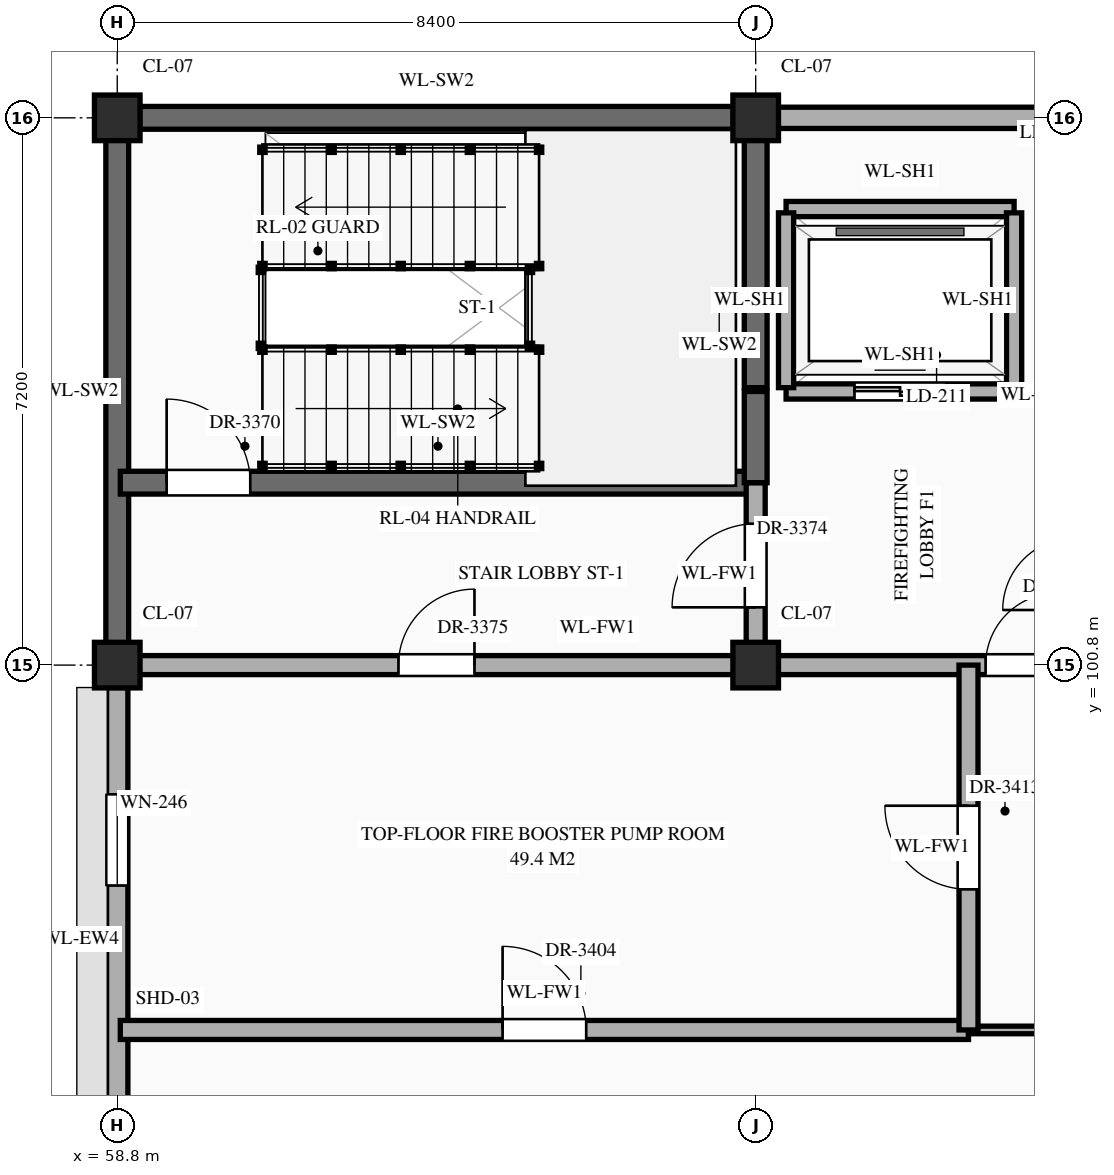
"""IFC4 building model, lengths in metres.
Left out: names, types, materials, properties, quantities, classifications, styles, units other than length and angle.
Written with IfcOpenShell. Run it as: python <this file> out.ifc"""

import sys

from ifc_helpers import new_model, si_unit, direction, frame, frame_2d, origin, origin_2d, place, context, subcontext, project, spatial, rectangle, extrude, element, fill, save


model = new_model("IFC4")
c1 = context("Model", 3, precision=1e-05, world=origin(), true_north=direction((0.0, 1.0)))
c2 = subcontext(c1, "Body", "Model", "MODEL_VIEW")
j1 = project(units=[si_unit("LENGTHUNIT", "METRE"), si_unit("PLANEANGLEUNIT", "RADIAN")], contexts=[c1])
p1 = place(None, origin())
s1 = spatial("IfcSite", under=j1, at=p1, CompositionType="ELEMENT")
p2 = place(p1, origin())
s2 = spatial("IfcBuilding", under=s1, at=p2, CompositionType="ELEMENT")
p3 = place(p2, frame((0.0, 0.0, 68.7)))
s3 = spatial("IfcBuildingStorey", under=s2, at=p3, CompositionType="ELEMENT", Elevation=68.7)
for number, where, z_axis, x_axis in (
    (1, (58.8, 100.8, 0.0), (0.0, 0.0, 1.0), (1.0, 0.0, 0.0)),
    (2, (58.8, 108.0, 0.0), (0.0, 0.0, 1.0), (1.0, 0.0, 0.0)),
    (3, (67.2, 100.8, 0.0), (0.0, 0.0, 1.0), (1.0, 0.0, 0.0)),
    (4, (67.2, 108.0, 0.0), (0.0, 0.0, 1.0), (1.0, 0.0, 0.0)),
):
    element("IfcColumn", number, at=place(p3, frame(where, z_axis=z_axis, x_axis=x_axis)), inside=s3, PredefinedType="COLUMN", context=c2, shape_type="SweptSolid", body=[
        extrude(rectangle(XDim=0.6, YDim=0.6, at=origin_2d()), origin(), (0.0, 0.0, 1.0), 4.5),
    ])
p4 = place(p3, frame((58.8, 93.895, 0.0), z_axis=(0.0, 0.0, 1.0), x_axis=(0.0, 1.0, 0.0)))
e5 = element("IfcWall", 5, at=p4, inside=s3, PredefinedType="STANDARD", context=c2, shape_type="SweptSolid", body=[
    extrude(rectangle(XDim=6.61, YDim=0.28, at=frame_2d((3.305, 0.0))), origin(), (0.0, 0.0, 1.0), 3.47),
])
p5 = place(p4, frame((4.005, 0.0, 0.85)))
e6 = element("IfcOpeningElement", 6, at=p5, cuts=e5, PredefinedType="OPENING", context=c2, shape_type="SweptSolid", body=[
    extrude(rectangle(XDim=1.2, YDim=1.56, at=frame_2d((0.6, 0.78))), frame((0.0, 0.152, 0.0), z_axis=(0.0, -1.0, 0.0), x_axis=(1.0, 0.0, 0.0)), (0.0, 0.0, 1.0), 0.304),
])
p6 = place(p3, frame((59.095, 108.0, 0.0), z_axis=(0.0, 0.0, 1.0), x_axis=(1.0, 0.0, 0.0)))
e7 = element("IfcWall", 7, at=p6, inside=s3, PredefinedType="SHEAR", context=c2, shape_type="SweptSolid", body=[
    extrude(rectangle(XDim=7.81, YDim=0.3, at=frame_2d((3.905, 0.0))), origin(), (0.0, 0.0, 1.0), 4.12),
])
p7 = place(p3, frame((58.8, 101.095, 0.0), z_axis=(0.0, 0.0, 1.0), x_axis=(0.0, 1.0, 0.0)))
e8 = element("IfcWall", 8, at=p7, inside=s3, PredefinedType="SHEAR", context=c2, shape_type="SweptSolid", body=[
    extrude(rectangle(XDim=6.61, YDim=0.3, at=frame_2d((3.305, 0.0))), origin(), (0.0, 0.0, 1.0), 4.12),
])
p8 = place(p3, frame((67.495, 108.0, 0.0), z_axis=(0.0, 0.0, 1.0), x_axis=(1.0, 0.0, 0.0)))
e9 = element("IfcWall", 9, at=p8, inside=s3, PredefinedType="STANDARD", context=c2, shape_type="SweptSolid", body=[
    extrude(rectangle(XDim=7.81, YDim=0.28, at=frame_2d((3.905, 0.0))), origin(), (0.0, 0.0, 1.0), 3.47),
])
p9 = place(p3, frame((58.84, 96.0, 0.0), z_axis=(0.0, 0.0, 1.0), x_axis=(1.0, 0.0, 0.0)))
e10 = element("IfcWall", 10, at=p9, inside=s3, PredefinedType="STANDARD", context=c2, shape_type="SweptSolid", body=[
    extrude(rectangle(XDim=11.16, YDim=0.25, at=frame_2d((5.58, 0.0))), origin(), (0.0, 0.0, 1.0), 4.12),
])
p10 = place(p9, frame((5.03, 0.0, 0.0)))
e11 = element("IfcOpeningElement", 11, at=p10, cuts=e10, PredefinedType="OPENING", context=c2, shape_type="SweptSolid", body=[
    extrude(rectangle(XDim=1.1, YDim=2.2, at=frame_2d((0.55, 1.1))), frame((0.0, 0.137, 0.0), z_axis=(0.0, -1.0, 0.0), x_axis=(1.0, 0.0, 0.0)), (0.0, 0.0, 1.0), 0.274),
])
p11 = place(p3, frame((70.0, 96.0, 0.0), z_axis=(0.0, 0.0, 1.0), x_axis=(1.0, 0.0, 0.0)))
e12 = element("IfcWall", 12, at=p11, inside=s3, PredefinedType="STANDARD", context=c2, shape_type="SweptSolid", body=[
    extrude(rectangle(XDim=2.8, YDim=0.1, at=frame_2d((1.4, 0.0))), origin(), (0.0, 0.0, 1.0), 4.12),
])
p12 = place(p11, frame((0.9, 0.0, 0.0)))
e13 = element("IfcOpeningElement", 13, at=p12, cuts=e12, PredefinedType="OPENING", context=c2, shape_type="SweptSolid", body=[
    extrude(rectangle(XDim=1.0, YDim=2.25, at=frame_2d((0.5, 1.125))), frame((0.0, 0.062, 0.0), z_axis=(0.0, -1.0, 0.0), x_axis=(1.0, 0.0, 0.0)), (0.0, 0.0, 1.0), 0.124),
])
p13 = place(p3, frame((58.84, 100.8, 0.0), z_axis=(0.0, 0.0, 1.0), x_axis=(1.0, 0.0, 0.0)))
e14 = element("IfcWall", 14, at=p13, inside=s3, PredefinedType="STANDARD", context=c2, shape_type="SweptSolid", body=[
    extrude(rectangle(XDim=12.56, YDim=0.25, at=frame_2d((6.28, 0.0))), origin(), (0.0, 0.0, 1.0), 3.27),
])
p14 = place(p13, frame((3.66, 0.0, 0.0)))
e15 = element("IfcOpeningElement", 15, at=p14, cuts=e14, PredefinedType="OPENING", context=c2, shape_type="SweptSolid", body=[
    extrude(rectangle(XDim=1.0, YDim=2.2, at=frame_2d((0.5, 1.1))), frame((0.0, 0.137, 0.0), z_axis=(0.0, -1.0, 0.0), x_axis=(1.0, 0.0, 0.0)), (0.0, 0.0, 1.0), 0.274),
])
p15 = place(p13, frame((11.385, 0.0, 0.0)))
e16 = element("IfcOpeningElement", 16, at=p15, cuts=e14, PredefinedType="OPENING", context=c2, shape_type="SweptSolid", body=[
    extrude(rectangle(XDim=0.95, YDim=2.15, at=frame_2d((0.475, 1.075))), frame((0.0, 0.137, 0.0), z_axis=(0.0, -1.0, 0.0), x_axis=(1.0, 0.0, 0.0)), (0.0, 0.0, 1.0), 0.274),
])
p16 = place(p3, frame((58.84, 103.2, 0.0), z_axis=(0.0, 0.0, 1.0), x_axis=(1.0, 0.0, 0.0)))
e17 = element("IfcWall", 17, at=p16, inside=s3, PredefinedType="SHEAR", context=c2, shape_type="SweptSolid", body=[
    extrude(rectangle(XDim=8.36, YDim=0.3, at=frame_2d((4.18, 0.0))), origin(), (0.0, 0.0, 1.0), 4.12),
])
p17 = place(p16, frame((0.61, 0.0, 0.0)))
e18 = element("IfcOpeningElement", 18, at=p17, cuts=e17, PredefinedType="OPENING", context=c2, shape_type="SweptSolid", body=[
    extrude(rectangle(XDim=1.1, YDim=2.2, at=frame_2d((0.55, 1.1))), frame((0.0, 0.162, 0.0), z_axis=(0.0, -1.0, 0.0), x_axis=(1.0, 0.0, 0.0)), (0.0, 0.0, 1.0), 0.324),
])
p18 = place(p3, frame((67.6, 104.4, 0.0), z_axis=(0.0, 0.0, 1.0), x_axis=(1.0, 0.0, 0.0)))
e19 = element("IfcWall", 19, at=p18, inside=s3, PredefinedType="STANDARD", context=c2, shape_type="SweptSolid", body=[
    extrude(rectangle(XDim=3.0, YDim=0.2, at=frame_2d((1.5, 0.0))), origin(), (0.0, 0.0, 1.0), 4.12),
])
p19 = place(p18, frame((0.9, 0.0, 0.0)))
e20 = element("IfcOpeningElement", 20, at=p19, cuts=e19, PredefinedType="OPENING", context=c2, shape_type="SweptSolid", body=[
    extrude(rectangle(XDim=1.2, YDim=2.15, at=frame_2d((0.6, 1.075))), frame((0.0, 0.112, 0.0), z_axis=(0.0, -1.0, 0.0), x_axis=(1.0, 0.0, 0.0)), (0.0, 0.0, 1.0), 0.224),
])
p20 = place(p3, frame((67.6, 106.8, 0.0), z_axis=(0.0, 0.0, 1.0), x_axis=(1.0, 0.0, 0.0)))
e21 = element("IfcWall", 21, at=p20, inside=s3, PredefinedType="STANDARD", context=c2, shape_type="SweptSolid", body=[
    extrude(rectangle(XDim=3.0, YDim=0.2, at=frame_2d((1.5, 0.0))), origin(), (0.0, 0.0, 1.0), 4.12),
])
p21 = place(p3, frame((67.2, 100.8, 0.0), z_axis=(0.0, 0.0, 1.0), x_axis=(0.0, 1.0, 0.0)))
e22 = element("IfcWall", 22, at=p21, inside=s3, PredefinedType="STANDARD", context=c2, shape_type="SweptSolid", body=[
    extrude(rectangle(XDim=2.4, YDim=0.25, at=frame_2d((1.2, 0.0))), origin(), (0.0, 0.0, 1.0), 3.37),
])
p22 = place(p21, frame((0.76, 0.0, 0.0)))
e23 = element("IfcOpeningElement", 23, at=p22, cuts=e22, PredefinedType="OPENING", context=c2, shape_type="SweptSolid", body=[
    extrude(rectangle(XDim=1.1, YDim=2.2, at=frame_2d((0.55, 1.1))), frame((0.0, 0.137, 0.0), z_axis=(0.0, -1.0, 0.0), x_axis=(1.0, 0.0, 0.0)), (0.0, 0.0, 1.0), 0.274),
])
p23 = place(p3, frame((67.2, 103.2, 0.0), z_axis=(0.0, 0.0, 1.0), x_axis=(0.0, 1.0, 0.0)))
e24 = element("IfcWall", 24, at=p23, inside=s3, PredefinedType="SHEAR", context=c2, shape_type="SweptSolid", body=[
    extrude(rectangle(XDim=1.2, YDim=0.3, at=frame_2d((0.6, 0.0))), origin(), (0.0, 0.0, 1.0), 4.12),
])
p24 = place(p3, frame((67.2, 104.45, 0.0), z_axis=(0.0, 0.0, 1.0), x_axis=(0.0, 1.0, 0.0)))
e25 = element("IfcWall", 25, at=p24, inside=s3, PredefinedType="SHEAR", context=c2, shape_type="SweptSolid", body=[
    extrude(rectangle(XDim=3.46, YDim=0.3, at=frame_2d((1.73, 0.0))), origin(), (0.0, 0.0, 1.0), 4.12),
])
p25 = place(p3, frame((67.6, 104.45, 0.0), z_axis=(0.0, 0.0, 1.0), x_axis=(0.0, 1.0, 0.0)))
e26 = element("IfcWall", 26, at=p25, inside=s3, PredefinedType="STANDARD", context=c2, shape_type="SweptSolid", body=[
    extrude(rectangle(XDim=2.3, YDim=0.2, at=frame_2d((1.15, 0.0))), origin(), (0.0, 0.0, 1.0), 4.12),
])
p26 = place(p3, frame((70.0, 96.0, 0.0), z_axis=(0.0, 0.0, 1.0), x_axis=(0.0, 1.0, 0.0)))
e27 = element("IfcWall", 27, at=p26, inside=s3, PredefinedType="STANDARD", context=c2, shape_type="SweptSolid", body=[
    extrude(rectangle(XDim=4.8, YDim=0.25, at=frame_2d((2.4, 0.0))), origin(), (0.0, 0.0, 1.0), 4.12),
])
p27 = place(p26, frame((1.85, 0.0, 0.0)))
e28 = element("IfcOpeningElement", 28, at=p27, cuts=e27, PredefinedType="OPENING", context=c2, shape_type="SweptSolid", body=[
    extrude(rectangle(XDim=1.1, YDim=2.2, at=frame_2d((0.55, 1.1))), frame((0.0, 0.137, 0.0), z_axis=(0.0, -1.0, 0.0), x_axis=(1.0, 0.0, 0.0)), (0.0, 0.0, 1.0), 0.274),
])
p28 = place(p3, frame((70.6, 104.45, 0.0), z_axis=(0.0, 0.0, 1.0), x_axis=(0.0, 1.0, 0.0)))
e29 = element("IfcWall", 29, at=p28, inside=s3, PredefinedType="STANDARD", context=c2, shape_type="SweptSolid", body=[
    extrude(rectangle(XDim=2.3, YDim=0.2, at=frame_2d((1.15, 0.0))), origin(), (0.0, 0.0, 1.0), 4.12),
])
p29 = place(p5, origin())
e30 = element("IfcWindow", 30, at=p29, inside=s3, PartitioningType="SINGLE_PANEL", PredefinedType="WINDOW", context=c2, shape_type="SweptSolid", body=[
    extrude(rectangle(XDim=1.2, YDim=1.56, at=frame_2d((0.6, 0.78))), frame((0.0, 0.03, 0.0), z_axis=(0.0, -1.0, 0.0), x_axis=(1.0, 0.0, 0.0)), (0.0, 0.0, 1.0), 0.06),
])
fill(e6, e30)
p30 = place(p19, origin())
e31 = element("IfcDoor", 31, at=p30, inside=s3, OperationType="DOUBLE_DOOR_SLIDING", PredefinedType="DOOR", context=c2, shape_type="SweptSolid", body=[
    extrude(rectangle(XDim=1.2, YDim=2.15, at=frame_2d((0.6, 1.075))), frame((0.0, 0.025, 0.0), z_axis=(0.0, -1.0, 0.0), x_axis=(1.0, 0.0, 0.0)), (0.0, 0.0, 1.0), 0.05),
])
fill(e20, e31)
p31 = place(p17, origin())
e32 = element("IfcDoor", 32, at=p31, inside=s3, OperationType="SINGLE_SWING_LEFT", PredefinedType="DOOR", context=c2, shape_type="SweptSolid", body=[
    extrude(rectangle(XDim=1.1, YDim=2.2, at=frame_2d((0.55, 1.1))), frame((0.0, 0.025, 0.0), z_axis=(0.0, -1.0, 0.0), x_axis=(1.0, 0.0, 0.0)), (0.0, 0.0, 1.0), 0.05),
])
fill(e18, e32)
p32 = place(p22, origin())
e33 = element("IfcDoor", 33, at=p32, inside=s3, OperationType="SINGLE_SWING_LEFT", PredefinedType="DOOR", context=c2, shape_type="SweptSolid", body=[
    extrude(rectangle(XDim=1.1, YDim=2.2, at=frame_2d((0.55, 1.1))), frame((0.0, 0.025, 0.0), z_axis=(0.0, -1.0, 0.0), x_axis=(1.0, 0.0, 0.0)), (0.0, 0.0, 1.0), 0.05),
])
fill(e23, e33)
p33 = place(p14, origin())
e34 = element("IfcDoor", 34, at=p33, inside=s3, OperationType="SINGLE_SWING_RIGHT", PredefinedType="DOOR", context=c2, shape_type="SweptSolid", body=[
    extrude(rectangle(XDim=1.0, YDim=2.2, at=frame_2d((0.5, 1.1))), frame((0.0, 0.025, 0.0), z_axis=(0.0, -1.0, 0.0), x_axis=(1.0, 0.0, 0.0)), (0.0, 0.0, 1.0), 0.05),
])
fill(e15, e34)
p34 = place(p15, origin())
e35 = element("IfcDoor", 35, at=p34, inside=s3, OperationType="SINGLE_SWING_RIGHT", PredefinedType="DOOR", context=c2, shape_type="SweptSolid", body=[
    extrude(rectangle(XDim=0.95, YDim=2.15, at=frame_2d((0.475, 1.075))), frame((0.0, 0.025, 0.0), z_axis=(0.0, -1.0, 0.0), x_axis=(1.0, 0.0, 0.0)), (0.0, 0.0, 1.0), 0.05),
])
fill(e16, e35)
p35 = place(p10, origin())
e36 = element("IfcDoor", 36, at=p35, inside=s3, OperationType="SINGLE_SWING_LEFT", PredefinedType="DOOR", context=c2, shape_type="SweptSolid", body=[
    extrude(rectangle(XDim=1.1, YDim=2.2, at=frame_2d((0.55, 1.1))), frame((0.0, 0.025, 0.0), z_axis=(0.0, -1.0, 0.0), x_axis=(1.0, 0.0, 0.0)), (0.0, 0.0, 1.0), 0.05),
])
fill(e11, e36)
p36 = place(p27, origin())
e37 = element("IfcDoor", 37, at=p36, inside=s3, OperationType="SINGLE_SWING_RIGHT", PredefinedType="DOOR", context=c2, shape_type="SweptSolid", body=[
    extrude(rectangle(XDim=1.1, YDim=2.2, at=frame_2d((0.55, 1.1))), frame((0.0, 0.025, 0.0), z_axis=(0.0, -1.0, 0.0), x_axis=(1.0, 0.0, 0.0)), (0.0, 0.0, 1.0), 0.05),
])
fill(e28, e37)
save(model, sys.argv[1])
